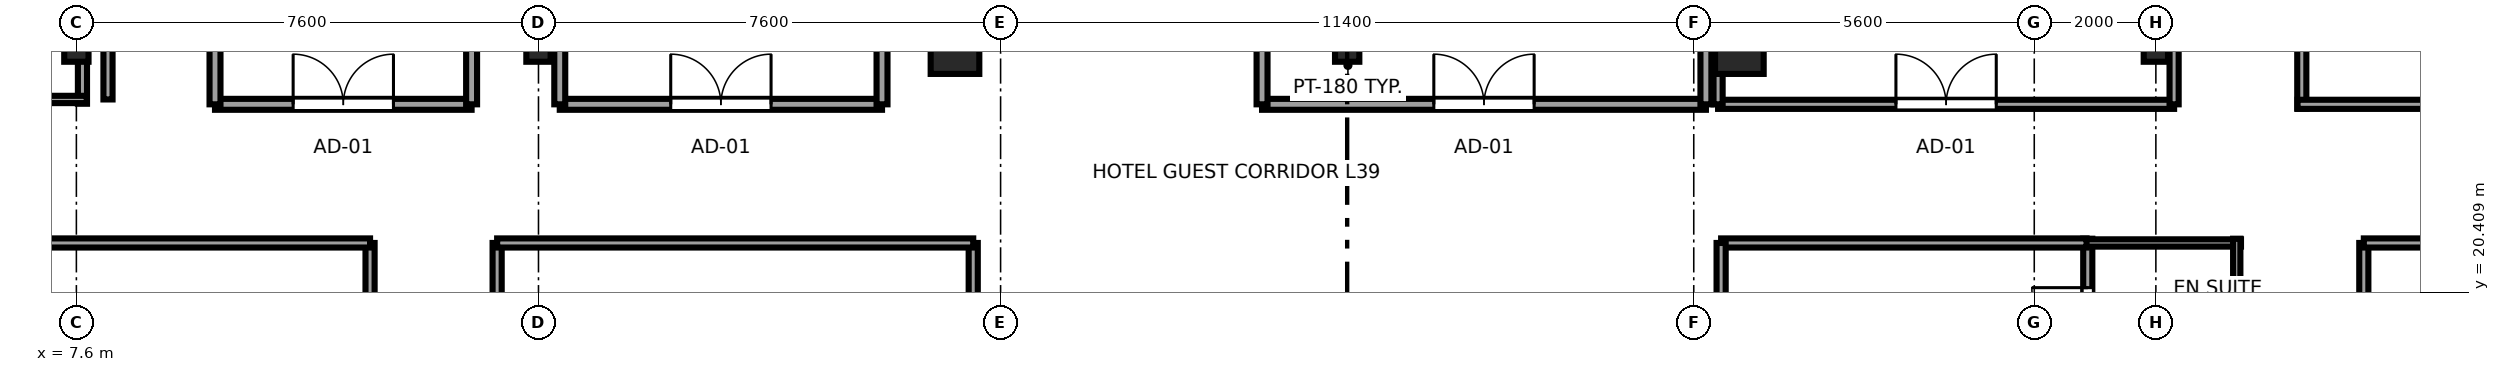
"""IFC4 building model, lengths in metres.
Left out: names, types, materials, properties, quantities, classifications, styles, units other than length and angle.
Written with IfcOpenShell. Run it as: python <this file> out.ifc"""

import sys

from ifc_helpers import new_model, si_unit, direction, frame, frame_2d, origin, origin_2d, place, context, subcontext, project, spatial, rectangle, i_section, extrude, source, transform, mapped, element, fill, save


model = new_model("IFC4")
c1 = context("Model", 3, precision=1e-05, world=origin(), true_north=direction((0.0, 1.0)))
c2 = subcontext(c1, "Body", "Model", "MODEL_VIEW")
j1 = project(units=[si_unit("LENGTHUNIT", "METRE"), si_unit("PLANEANGLEUNIT", "RADIAN")], contexts=[c1])
p1 = place(None, origin())
s1 = spatial("IfcSite", under=j1, at=p1, CompositionType="ELEMENT")
p2 = place(p1, origin())
s2 = spatial("IfcBuilding", under=s1, at=p2, CompositionType="ELEMENT")
p3 = place(p2, frame((0.0, 0.0, 150.6)))
s3 = spatial("IfcBuildingStorey", under=s2, at=p3, CompositionType="ELEMENT", Elevation=150.6)
m1 = source(origin(), c2, "Body", "SweptSolid", [
    extrude(i_section(OverallWidth=0.4, OverallDepth=0.4, WebThickness=0.02, FlangeThickness=0.035, at=origin_2d()), origin(), (0.0, 0.0, 1.0), 3.55),
])
for number, where, z_axis, x_axis in (
    (1, (7.6, 24.4, 0.0), (0.0, 0.0, 1.0), (1.0, 0.0, 0.0)),
    (2, (15.2, 24.4, 0.0), (0.0, 0.0, 1.0), (1.0, 0.0, 0.0)),
):
    element("IfcColumn", number, at=place(p3, frame(where, z_axis=z_axis, x_axis=x_axis)), inside=s3, PredefinedType="COLUMN", context=c2, shape_type="MappedRepresentation", body=[
        mapped(m1, transform((0.0, 0.0, 0.0), x_axis=(1.0, 0.0, 0.0), y_axis=(0.0, 1.0, 0.0), z_axis=(0.0, 0.0, 1.0), scale=1.0)),
    ])
m2 = source(origin(), c2, "Body", "SweptSolid", [
    extrude(rectangle(XDim=0.8, YDim=0.8, at=origin_2d()), origin(), (0.0, 0.0, 1.0), 3.55),
])
for number, where, z_axis, x_axis in (
    (3, (22.05, 24.4, 0.0), (0.0, 0.0, 1.0), (1.0, 0.0, 0.0)),
    (4, (34.95, 24.4, 0.0), (0.0, 0.0, 1.0), (1.0, 0.0, 0.0)),
):
    element("IfcColumn", number, at=place(p3, frame(where, z_axis=z_axis, x_axis=x_axis)), inside=s3, PredefinedType="COLUMN", context=c2, shape_type="MappedRepresentation", body=[
        mapped(m2, transform((0.0, 0.0, 0.0), x_axis=(1.0, 0.0, 0.0), y_axis=(0.0, 1.0, 0.0), z_axis=(0.0, 0.0, 1.0), scale=1.0)),
    ])
for number, where, z_axis, x_axis in (
    (5, (41.8, 24.4, 0.0), (0.0, 0.0, 1.0), (1.0, 0.0, 0.0)),
    (6, (28.5, 24.4, 0.0), (0.0, 0.0, 1.0), (1.0, 0.0, 0.0)),
):
    element("IfcColumn", number, at=place(p3, frame(where, z_axis=z_axis, x_axis=x_axis)), inside=s3, PredefinedType="COLUMN", context=c2, shape_type="MappedRepresentation", body=[
        mapped(m1, transform((0.0, 0.0, 0.0), x_axis=(1.0, 0.0, 0.0), y_axis=(0.0, 1.0, 0.0), z_axis=(0.0, 0.0, 1.0), scale=1.0)),
    ])
p4 = place(p3, frame((40.68, 18.9, 0.0), z_axis=(0.0, 0.0, 1.0), x_axis=(0.0, 1.0, 0.0)))
e7 = element("IfcWall", 7, at=p4, inside=s3, PredefinedType="PARTITIONING", context=c2, shape_type="SweptSolid", body=[
    extrude(rectangle(XDim=2.39, YDim=0.15, at=frame_2d((1.195, 0.0))), origin(), (0.0, 0.0, 1.0), 3.37),
])
p5 = place(p4, frame((0.665, 0.0, 0.0)))
e8 = element("IfcOpeningElement", 8, at=p5, cuts=e7, PredefinedType="OPENING", context=c2, shape_type="SweptSolid", body=[
    extrude(rectangle(XDim=0.92, YDim=2.01, at=frame_2d((0.46, 1.005))), frame((0.0, 0.085, 0.0), z_axis=(0.0, -1.0, 0.0), x_axis=(1.0, 0.0, 0.0)), (0.0, 0.0, 1.0), 0.17),
])
p6 = place(p3, frame((40.61, 21.22, 0.0), z_axis=(0.0, 0.0, 1.0), x_axis=(1.0, 0.0, 0.0)))
e9 = element("IfcWall", 9, at=p6, inside=s3, PredefinedType="PLUMBINGWALL", context=c2, shape_type="SweptSolid", body=[
    extrude(rectangle(XDim=2.59, YDim=0.12, at=frame_2d((1.295, 0.0))), origin(), (0.0, 0.0, 1.0), 3.37),
])
p7 = place(p3, frame((43.13, 18.9, 0.0), z_axis=(0.0, 0.0, 1.0), x_axis=(0.0, 1.0, 0.0)))
e10 = element("IfcWall", 10, at=p7, inside=s3, PredefinedType="PLUMBINGWALL", context=c2, shape_type="SweptSolid", body=[
    extrude(rectangle(XDim=2.39, YDim=0.12, at=frame_2d((1.195, 0.0))), origin(), (0.0, 0.0, 1.0), 3.37),
])
p8 = place(p3, frame((7.7, 23.51, 0.0), z_axis=(0.0, 0.0, 1.0), x_axis=(0.0, 1.0, 0.0)))
e11 = element("IfcWall", 11, at=p8, inside=s3, PredefinedType="PARTITIONING", context=c2, shape_type="SweptSolid", body=[
    extrude(rectangle(XDim=2.39, YDim=0.15, at=frame_2d((1.195, 0.0))), origin(), (0.0, 0.0, 1.0), 2.16),
])
p9 = place(p3, frame((5.48, 23.58, 0.0), z_axis=(0.0, 0.0, 1.0), x_axis=(1.0, 0.0, 0.0)))
e12 = element("IfcWall", 12, at=p9, inside=s3, PredefinedType="PLUMBINGWALL", context=c2, shape_type="SweptSolid", body=[
    extrude(rectangle(XDim=2.29, YDim=0.12, at=frame_2d((1.145, 0.0))), origin(), (0.0, 0.0, 1.0), 3.37),
])
p10 = place(p3, frame((12.43, 18.61, 0.0), z_axis=(0.0, 0.0, 1.0), x_axis=(0.0, 1.0, 0.0)))
e13 = element("IfcWall", 13, at=p10, inside=s3, PredefinedType="PARTITIONING", context=c2, shape_type="SweptSolid", body=[
    extrude(rectangle(XDim=2.61, YDim=0.15, at=frame_2d((1.305, 0.0))), origin(), (0.0, 0.0, 1.0), 3.37),
])
p11 = place(p10, frame((0.795, 0.0, 0.0)))
e14 = element("IfcOpeningElement", 14, at=p11, cuts=e13, PredefinedType="OPENING", context=c2, shape_type="SweptSolid", body=[
    extrude(rectangle(XDim=0.98, YDim=2.12, at=frame_2d((0.49, 1.06))), frame((0.0, 0.085, 0.0), z_axis=(0.0, -1.0, 0.0), x_axis=(1.0, 0.0, 0.0)), (0.0, 0.0, 1.0), 0.17),
])
p12 = place(p3, frame((3.005, 21.22, 0.0), z_axis=(0.0, 0.0, 1.0), x_axis=(1.0, 0.0, 0.0)))
e15 = element("IfcWall", 15, at=p12, inside=s3, PredefinedType="PARTITIONING", context=c2, shape_type="SweptSolid", body=[
    extrude(rectangle(XDim=9.425, YDim=0.15, at=frame_2d((4.712, 0.0))), origin(), (0.0, 0.0, 1.0), 3.37),
])
p13 = place(p3, frame((14.52, 14.61, 0.0), z_axis=(0.0, 0.0, 1.0), x_axis=(0.0, 1.0, 0.0)))
e16 = element("IfcWall", 16, at=p13, inside=s3, PredefinedType="PARTITIONING", context=c2, shape_type="SweptSolid", body=[
    extrude(rectangle(XDim=6.61, YDim=0.15, at=frame_2d((3.305, 0.0))), origin(), (0.0, 0.0, 1.0), 3.37),
])
p14 = place(p13, frame((2.795, 0.0, 0.0)))
e17 = element("IfcOpeningElement", 17, at=p14, cuts=e16, PredefinedType="OPENING", context=c2, shape_type="SweptSolid", body=[
    extrude(rectangle(XDim=0.98, YDim=2.12, at=frame_2d((0.49, 1.06))), frame((0.0, 0.085, 0.0), z_axis=(0.0, -1.0, 0.0), x_axis=(1.0, 0.0, 0.0)), (0.0, 0.0, 1.0), 0.17),
])
p15 = place(p3, frame((22.35, 12.28, 0.0), z_axis=(0.0, 0.0, 1.0), x_axis=(0.0, 1.0, 0.0)))
e18 = element("IfcWall", 18, at=p15, inside=s3, PredefinedType="PARTITIONING", context=c2, shape_type="SweptSolid", body=[
    extrude(rectangle(XDim=8.94, YDim=0.15, at=frame_2d((4.47, 0.0))), origin(), (0.0, 0.0, 1.0), 2.16),
])
p16 = place(p3, frame((14.52, 21.22, 0.0), z_axis=(0.0, 0.0, 1.0), x_axis=(1.0, 0.0, 0.0)))
e19 = element("IfcWall", 19, at=p16, inside=s3, PredefinedType="PARTITIONING", context=c2, shape_type="SweptSolid", body=[
    extrude(rectangle(XDim=7.83, YDim=0.15, at=frame_2d((3.915, 0.0))), origin(), (0.0, 0.0, 1.0), 3.37),
])
p17 = place(p3, frame((34.65, 21.22, 0.0), z_axis=(0.0, 0.0, 1.0), x_axis=(1.0, 0.0, 0.0)))
e20 = element("IfcWall", 20, at=p17, inside=s3, PredefinedType="PARTITIONING", context=c2, shape_type="SweptSolid", body=[
    extrude(rectangle(XDim=6.01, YDim=0.15, at=frame_2d((3.005, 0.0))), origin(), (0.0, 0.0, 1.0), 3.37),
])
p18 = place(p3, frame((34.65, 15.28, 0.0), z_axis=(0.0, 0.0, 1.0), x_axis=(0.0, 1.0, 0.0)))
e21 = element("IfcWall", 21, at=p18, inside=s3, PredefinedType="PARTITIONING", context=c2, shape_type="SweptSolid", body=[
    extrude(rectangle(XDim=5.94, YDim=0.15, at=frame_2d((2.97, 0.0))), origin(), (0.0, 0.0, 1.0), 2.16),
])
p19 = place(p3, frame((45.22, 18.61, 0.0), z_axis=(0.0, 0.0, 1.0), x_axis=(0.0, 1.0, 0.0)))
e22 = element("IfcWall", 22, at=p19, inside=s3, PredefinedType="PARTITIONING", context=c2, shape_type="SweptSolid", body=[
    extrude(rectangle(XDim=2.61, YDim=0.15, at=frame_2d((1.305, 0.0))), origin(), (0.0, 0.0, 1.0), 3.37),
])
p20 = place(p19, frame((0.795, 0.0, 0.0)))
e23 = element("IfcOpeningElement", 23, at=p20, cuts=e22, PredefinedType="OPENING", context=c2, shape_type="SweptSolid", body=[
    extrude(rectangle(XDim=0.98, YDim=2.12, at=frame_2d((0.49, 1.06))), frame((0.0, 0.085, 0.0), z_axis=(0.0, -1.0, 0.0), x_axis=(1.0, 0.0, 0.0)), (0.0, 0.0, 1.0), 0.17),
])
p21 = place(p3, frame((45.22, 21.22, 0.0), z_axis=(0.0, 0.0, 1.0), x_axis=(1.0, 0.0, 0.0)))
e24 = element("IfcWall", 24, at=p21, inside=s3, PredefinedType="PARTITIONING", context=c2, shape_type="SweptSolid", body=[
    extrude(rectangle(XDim=8.775, YDim=0.15, at=frame_2d((4.388, 0.0))), origin(), (0.0, 0.0, 1.0), 3.37),
])
p22 = place(p3, frame((8.12, 23.58, 0.0), z_axis=(0.0, 0.0, 1.0), x_axis=(0.0, 1.0, 0.0)))
e25 = element("IfcWall", 25, at=p22, inside=s3, PredefinedType="PARTITIONING", context=c2, shape_type="SweptSolid", body=[
    extrude(rectangle(XDim=10.74, YDim=0.15, at=frame_2d((5.37, 0.0))), origin(), (0.0, 0.0, 1.0), 3.37),
])
p23 = place(p22, frame((4.88, 0.0, 0.0)))
e26 = element("IfcOpeningElement", 26, at=p23, cuts=e25, PredefinedType="OPENING", context=c2, shape_type="SweptSolid", body=[
    extrude(rectangle(XDim=0.98, YDim=2.12, at=frame_2d((0.49, 1.06))), frame((0.0, 0.085, 0.0), z_axis=(0.0, -1.0, 0.0), x_axis=(1.0, 0.0, 0.0)), (0.0, 0.0, 1.0), 0.17),
])
p24 = place(p3, frame((44.2, 23.43, 0.0), z_axis=(0.0, 0.0, 1.0), x_axis=(0.0, 1.0, 0.0)))
e27 = element("IfcWall", 27, at=p24, inside=s3, PredefinedType="PARTITIONING", context=c2, shape_type="SweptSolid", body=[
    extrude(rectangle(XDim=3.74, YDim=0.15, at=frame_2d((1.87, 0.0))), origin(), (0.0, 0.0, 1.0), 3.37),
])
p25 = place(p24, frame((1.24, 0.0, 0.0)))
e28 = element("IfcOpeningElement", 28, at=p25, cuts=e27, PredefinedType="OPENING", context=c2, shape_type="SweptSolid", body=[
    extrude(rectangle(XDim=0.92, YDim=2.01, at=frame_2d((0.46, 1.005))), frame((0.0, 0.085, 0.0), z_axis=(0.0, -1.0, 0.0), x_axis=(1.0, 0.0, 0.0)), (0.0, 0.0, 1.0), 0.17),
])
p26 = place(p3, frame((44.13, 23.5, 0.0), z_axis=(0.0, 0.0, 1.0), x_axis=(1.0, 0.0, 0.0)))
e29 = element("IfcWall", 29, at=p26, inside=s3, PredefinedType="PARTITIONING", context=c2, shape_type="SweptSolid", body=[
    extrude(rectangle(XDim=4.54, YDim=0.15, at=frame_2d((2.27, 0.0))), origin(), (0.0, 0.0, 1.0), 3.37),
])
p27 = place(p3, frame((9.88, 23.5, 0.0), z_axis=(0.0, 0.0, 1.0), x_axis=(1.0, 0.0, 0.0)))
e30 = element("IfcWall", 30, at=p27, inside=s3, PredefinedType="PARTITIONING", context=c2, shape_type="SweptSolid", body=[
    extrude(rectangle(XDim=4.22, YDim=0.18, at=frame_2d((2.11, 0.0))), origin(), (0.0, 0.0, 1.0), 3.37),
])
p28 = place(p27, frame((1.285, 0.0, 0.0)))
e31 = element("IfcOpeningElement", 31, at=p28, cuts=e30, PredefinedType="OPENING", context=c2, shape_type="SweptSolid", body=[
    extrude(rectangle(XDim=1.65, YDim=2.15, at=frame_2d((0.825, 1.075))), frame((0.0, 0.1, 0.0), z_axis=(0.0, -1.0, 0.0), x_axis=(1.0, 0.0, 0.0)), (0.0, 0.0, 1.0), 0.2),
])
for number, where, z_axis, x_axis in (
    (32, (9.88, 23.5, 0.0), (0.0, 0.0, 1.0), (0.0, 1.0, 0.0)),
    (33, (14.1, 23.5, 0.0), (0.0, 0.0, 1.0), (0.0, 1.0, 0.0)),
):
    element("IfcWall", number, at=place(p3, frame(where, z_axis=z_axis, x_axis=x_axis)), inside=s3, PredefinedType="PARTITIONING", context=c2, shape_type="SweptSolid", body=[
        extrude(rectangle(XDim=6.25, YDim=0.18, at=frame_2d((3.125, 0.0))), origin(), (0.0, 0.0, 1.0), 3.37),
    ])
p29 = place(p3, frame((27.1, 23.5, 0.0), z_axis=(0.0, 0.0, 1.0), x_axis=(1.0, 0.0, 0.0)))
e34 = element("IfcWall", 34, at=p29, inside=s3, PredefinedType="PARTITIONING", context=c2, shape_type="SweptSolid", body=[
    extrude(rectangle(XDim=7.3, YDim=0.18, at=frame_2d((3.65, 0.0))), origin(), (0.0, 0.0, 1.0), 3.37),
])
p30 = place(p29, frame((2.825, 0.0, 0.0)))
e35 = element("IfcOpeningElement", 35, at=p30, cuts=e34, PredefinedType="OPENING", context=c2, shape_type="SweptSolid", body=[
    extrude(rectangle(XDim=1.65, YDim=2.15, at=frame_2d((0.825, 1.075))), frame((0.0, 0.1, 0.0), z_axis=(0.0, -1.0, 0.0), x_axis=(1.0, 0.0, 0.0)), (0.0, 0.0, 1.0), 0.2),
])
for number, where, z_axis, x_axis in (
    (36, (27.1, 23.5, 0.0), (0.0, 0.0, 1.0), (0.0, 1.0, 0.0)),
    (37, (34.4, 23.5, 0.0), (0.0, 0.0, 1.0), (0.0, 1.0, 0.0)),
):
    element("IfcWall", number, at=place(p3, frame(where, z_axis=z_axis, x_axis=x_axis)), inside=s3, PredefinedType="PARTITIONING", context=c2, shape_type="SweptSolid", body=[
        extrude(rectangle(XDim=6.3, YDim=0.18, at=frame_2d((3.15, 0.0))), origin(), (0.0, 0.0, 1.0), 3.37),
    ])
p31 = place(p3, frame((15.55, 23.5, 0.0), z_axis=(0.0, 0.0, 1.0), x_axis=(1.0, 0.0, 0.0)))
e38 = element("IfcWall", 38, at=p31, inside=s3, PredefinedType="PARTITIONING", context=c2, shape_type="SweptSolid", body=[
    extrude(rectangle(XDim=5.3, YDim=0.18, at=frame_2d((2.65, 0.0))), origin(), (0.0, 0.0, 1.0), 3.37),
])
p32 = place(p31, frame((1.825, 0.0, 0.0)))
e39 = element("IfcOpeningElement", 39, at=p32, cuts=e38, PredefinedType="OPENING", context=c2, shape_type="SweptSolid", body=[
    extrude(rectangle(XDim=1.65, YDim=2.15, at=frame_2d((0.825, 1.075))), frame((0.0, 0.1, 0.0), z_axis=(0.0, -1.0, 0.0), x_axis=(1.0, 0.0, 0.0)), (0.0, 0.0, 1.0), 0.2),
])
for number, where, z_axis, x_axis in (
    (40, (15.55, 23.5, 0.0), (0.0, 0.0, 1.0), (0.0, 1.0, 0.0)),
    (41, (20.85, 23.5, 0.0), (0.0, 0.0, 1.0), (0.0, 1.0, 0.0)),
):
    element("IfcWall", number, at=place(p3, frame(where, z_axis=z_axis, x_axis=x_axis)), inside=s3, PredefinedType="PARTITIONING", context=c2, shape_type="SweptSolid", body=[
        extrude(rectangle(XDim=6.3, YDim=0.18, at=frame_2d((3.15, 0.0))), origin(), (0.0, 0.0, 1.0), 3.37),
    ])
p33 = place(p3, frame((34.6, 23.5, 0.0), z_axis=(0.0, 0.0, 1.0), x_axis=(1.0, 0.0, 0.0)))
e42 = element("IfcWall", 42, at=p33, inside=s3, PredefinedType="PARTITIONING", context=c2, shape_type="SweptSolid", body=[
    extrude(rectangle(XDim=7.5, YDim=0.15, at=frame_2d((3.75, 0.0))), origin(), (0.0, 0.0, 1.0), 3.37),
])
p34 = place(p33, frame((2.925, 0.0, 0.0)))
e43 = element("IfcOpeningElement", 43, at=p34, cuts=e42, PredefinedType="OPENING", context=c2, shape_type="SweptSolid", body=[
    extrude(rectangle(XDim=1.65, YDim=2.15, at=frame_2d((0.825, 1.075))), frame((0.0, 0.085, 0.0), z_axis=(0.0, -1.0, 0.0), x_axis=(1.0, 0.0, 0.0)), (0.0, 0.0, 1.0), 0.17),
])
p35 = place(p3, frame((34.6, 23.5, 0.0), z_axis=(0.0, 0.0, 1.0), x_axis=(0.0, 1.0, 0.0)))
e44 = element("IfcWall", 44, at=p35, inside=s3, PredefinedType="PARTITIONING", context=c2, shape_type="SweptSolid", body=[
    extrude(rectangle(XDim=5.9, YDim=0.15, at=frame_2d((2.95, 0.0))), origin(), (0.0, 0.0, 1.0), 3.37),
])
p36 = place(p3, frame((42.1, 23.5, 0.0), z_axis=(0.0, 0.0, 1.0), x_axis=(0.0, 1.0, 0.0)))
e45 = element("IfcWall", 45, at=p36, inside=s3, PredefinedType="PARTITIONING", context=c2, shape_type="SweptSolid", body=[
    extrude(rectangle(XDim=5.9, YDim=0.15, at=frame_2d((2.95, 0.0))), origin(), (0.0, 0.0, 1.0), 2.16),
])
m3 = source(origin(), c2, "Body", "SweptSolid", [
    extrude(rectangle(XDim=0.92, YDim=2.01, at=frame_2d((0.46, 1.005))), frame((0.0, 0.025, 0.0), z_axis=(0.0, -1.0, 0.0), x_axis=(1.0, 0.0, 0.0)), (0.0, 0.0, 1.0), 0.05),
])
p37 = place(p5, origin())
e46 = element("IfcDoor", 46, at=p37, inside=s3, OperationType="SINGLE_SWING_RIGHT", PredefinedType="DOOR", context=c2, shape_type="MappedRepresentation", body=[
    mapped(m3, transform((0.0, 0.0, 0.0), x_axis=(1.0, 0.0, 0.0), y_axis=(0.0, 1.0, 0.0), z_axis=(0.0, 0.0, 1.0), scale=1.0)),
])
fill(e8, e46)
m4 = source(origin(), c2, "Body", "SweptSolid", [
    extrude(rectangle(XDim=1.65, YDim=2.15, at=frame_2d((0.825, 1.075))), frame((0.0, 0.025, 0.0), z_axis=(0.0, -1.0, 0.0), x_axis=(1.0, 0.0, 0.0)), (0.0, 0.0, 1.0), 0.05),
])
p38 = place(p28, origin())
e47 = element("IfcDoor", 47, at=p38, inside=s3, OperationType="DOUBLE_DOOR_SINGLE_SWING", PredefinedType="DOOR", context=c2, shape_type="MappedRepresentation", body=[
    mapped(m4, transform((0.0, 0.0, 0.0), x_axis=(1.0, 0.0, 0.0), y_axis=(0.0, 1.0, 0.0), z_axis=(0.0, 0.0, 1.0), scale=1.0)),
])
fill(e31, e47)
p39 = place(p30, origin())
e48 = element("IfcDoor", 48, at=p39, inside=s3, OperationType="DOUBLE_DOOR_SINGLE_SWING", PredefinedType="DOOR", context=c2, shape_type="MappedRepresentation", body=[
    mapped(m4, transform((0.0, 0.0, 0.0), x_axis=(1.0, 0.0, 0.0), y_axis=(0.0, 1.0, 0.0), z_axis=(0.0, 0.0, 1.0), scale=1.0)),
])
fill(e35, e48)
p40 = place(p32, origin())
e49 = element("IfcDoor", 49, at=p40, inside=s3, OperationType="DOUBLE_DOOR_SINGLE_SWING", PredefinedType="DOOR", context=c2, shape_type="MappedRepresentation", body=[
    mapped(m4, transform((0.0, 0.0, 0.0), x_axis=(1.0, 0.0, 0.0), y_axis=(0.0, 1.0, 0.0), z_axis=(0.0, 0.0, 1.0), scale=1.0)),
])
fill(e39, e49)
p41 = place(p34, origin())
e50 = element("IfcDoor", 50, at=p41, inside=s3, OperationType="DOUBLE_DOOR_SINGLE_SWING", PredefinedType="DOOR", context=c2, shape_type="MappedRepresentation", body=[
    mapped(m4, transform((0.0, 0.0, 0.0), x_axis=(1.0, 0.0, 0.0), y_axis=(0.0, 1.0, 0.0), z_axis=(0.0, 0.0, 1.0), scale=1.0)),
])
fill(e43, e50)
save(model, sys.argv[1])
